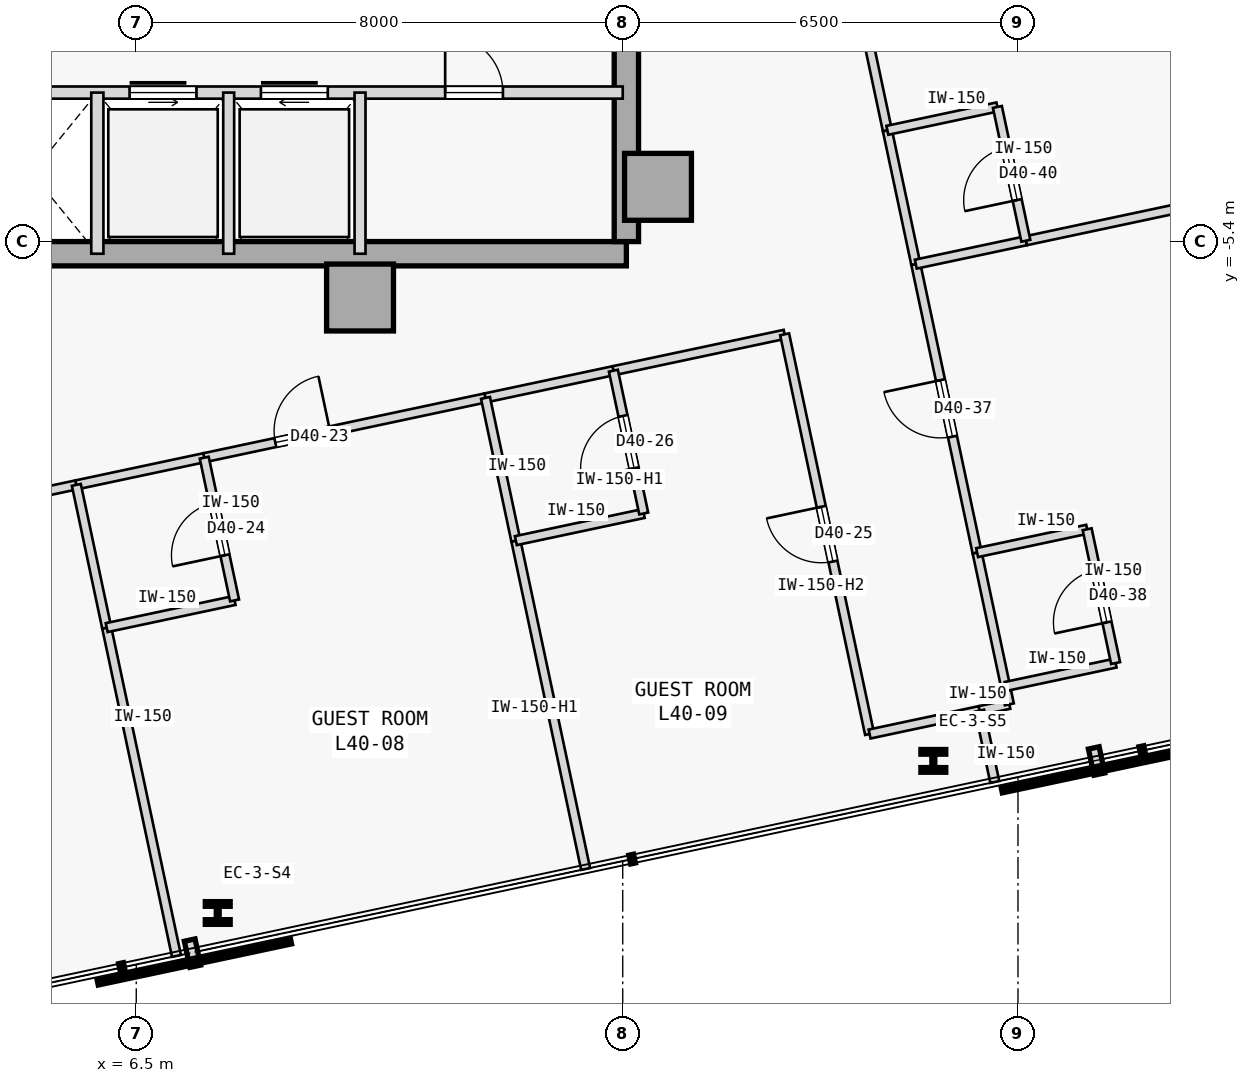
"""IFC4 building model, lengths in metres.
Left out: names, types, materials, properties, quantities, classifications, styles, units other than length and angle.
Written with IfcOpenShell. Run it as: python <this file> out.ifc"""

import sys

from ifc_helpers import new_model, si_unit, direction, frame, frame_2d, origin, origin_2d, place, context, subcontext, project, spatial, rectangle, i_section, extrude, element, fill, save


model = new_model("IFC4")
c1 = context("Model", 3, precision=1e-05, world=origin(), true_north=direction((0.0, 1.0)))
c2 = subcontext(c1, "Body", "Model", "MODEL_VIEW")
j1 = project(units=[si_unit("LENGTHUNIT", "METRE"), si_unit("PLANEANGLEUNIT", "RADIAN")], contexts=[c1])
p1 = place(None, origin())
s1 = spatial("IfcSite", under=j1, at=p1, CompositionType="ELEMENT")
p2 = place(p1, origin())
s2 = spatial("IfcBuilding", under=s1, at=p2, CompositionType="ELEMENT")
p3 = place(p2, frame((0.0, 0.0, 158.2)))
s3 = spatial("IfcBuildingStorey", under=s2, at=p3, CompositionType="ELEMENT", Elevation=158.2)
for number, where, z_axis, x_axis in (
    (1, (15.08, -4.5, 0.0), (0.0, 0.0, 1.0), (1.0, 0.0, 0.0)),
    (2, (10.18, -6.32, 0.0), (0.0, 0.0, 1.0), (1.0, 0.0, 0.0)),
):
    element("IfcColumn", number, at=place(p3, frame(where, z_axis=z_axis, x_axis=x_axis)), inside=s3, PredefinedType="COLUMN", context=c2, shape_type="SweptSolid", body=[
        extrude(rectangle(XDim=1.1, YDim=1.1, at=origin_2d()), origin(), (0.0, 0.0, 1.0), 3.4),
    ])
p4 = place(p3, frame((3.7, -5.6, 0.0), z_axis=(0.0, 0.0, 1.0), x_axis=(1.0, 0.0, 0.0)))
e3 = element("IfcWall", 3, at=p4, inside=s3, PredefinedType="SHEAR", context=c2, shape_type="SweptSolid", body=[
    extrude(rectangle(XDim=10.86, YDim=0.4, at=frame_2d((5.43, 0.0))), origin(), (0.0, 0.0, 1.0), 3.175),
])
p5 = place(p3, frame((14.56, -5.4, 0.0), z_axis=(0.0, 0.0, 1.0), x_axis=(0.0, 1.0, 0.0)))
e4 = element("IfcWall", 4, at=p5, inside=s3, PredefinedType="SHEAR", context=c2, shape_type="SweptSolid", body=[
    extrude(rectangle(XDim=10.8, YDim=0.4, at=frame_2d((5.4, 0.0))), origin(), (0.0, 0.0, 1.0), 3.175),
])
for number, where, z_axis, x_axis in (
    (5, (7.84, -16.441, 0.0), (0.0, 0.0, 1.0), (1.0, 0.0, 0.0)),
    (6, (19.608, -13.94, 0.0), (0.0, 0.0, 1.0), (1.0, 0.0, 0.0)),
):
    element("IfcColumn", number, at=place(p3, frame(where, z_axis=z_axis, x_axis=x_axis)), inside=s3, PredefinedType="COLUMN", context=c2, shape_type="SweptSolid", body=[
        extrude(i_section(OverallWidth=0.409, OverallDepth=0.374, WebThickness=0.048, FlangeThickness=0.077, FilletRadius=0.015, at=origin_2d()), origin(), (0.0, 0.0, 1.0), 3.4),
    ])
p6 = place(p3, frame((3.7, -2.95, 0.0), z_axis=(0.0, 0.0, 1.0), x_axis=(1.0, 0.0, 0.0)))
e7 = element("IfcWall", 7, at=p6, inside=s3, PredefinedType="STANDARD", context=c2, shape_type="SweptSolid", body=[
    extrude(rectangle(XDim=10.8, YDim=0.2, at=frame_2d((5.4, 0.0))), origin(), (0.0, 0.0, 1.0), 3.175),
])
p7 = place(p6, frame((2.69, 0.0, 0.0)))
e8 = element("IfcOpeningElement", 8, at=p7, cuts=e7, PredefinedType="OPENING", context=c2, shape_type="SweptSolid", body=[
    extrude(rectangle(XDim=1.1, YDim=2.15, at=frame_2d((0.55, 1.075))), frame((0.0, 0.11, 0.0), z_axis=(0.0, -1.0, 0.0), x_axis=(1.0, 0.0, 0.0)), (0.0, 0.0, 1.0), 0.22),
])
p8 = place(p6, frame((4.85, 0.0, 0.0)))
e9 = element("IfcOpeningElement", 9, at=p8, cuts=e7, PredefinedType="OPENING", context=c2, shape_type="SweptSolid", body=[
    extrude(rectangle(XDim=1.1, YDim=2.15, at=frame_2d((0.55, 1.075))), frame((0.0, 0.11, 0.0), z_axis=(0.0, -1.0, 0.0), x_axis=(1.0, 0.0, 0.0)), (0.0, 0.0, 1.0), 0.22),
])
p9 = place(p6, frame((7.88, 0.0, 0.0)))
e10 = element("IfcOpeningElement", 10, at=p9, cuts=e7, PredefinedType="OPENING", context=c2, shape_type="SweptSolid", body=[
    extrude(rectangle(XDim=0.95, YDim=2.15, at=frame_2d((0.475, 1.075))), frame((0.0, 0.11, 0.0), z_axis=(0.0, -1.0, 0.0), x_axis=(1.0, 0.0, 0.0)), (0.0, 0.0, 1.0), 0.22),
])
p10 = place(p3, frame((5.86, -5.6, 0.0), z_axis=(0.0, 0.0, 1.0), x_axis=(0.0, 1.0, 0.0)))
e11 = element("IfcWall", 11, at=p10, inside=s3, PredefinedType="STANDARD", context=c2, shape_type="SweptSolid", body=[
    extrude(rectangle(XDim=2.65, YDim=0.2, at=frame_2d((1.325, 0.0))), origin(), (0.0, 0.0, 1.0), 3.175),
])
for number, where, z_axis, x_axis in (
    (12, (10.18, -5.6, 0.0), (0.0, 0.0, 1.0), (0.0, 1.0, 0.0)),
    (13, (8.02, -5.6, 0.0), (0.0, 0.0, 1.0), (0.0, 1.0, 0.0)),
):
    element("IfcWall", number, at=place(p3, frame(where, z_axis=z_axis, x_axis=x_axis)), inside=s3, PredefinedType="STANDARD", context=c2, shape_type="SweptSolid", body=[
        extrude(rectangle(XDim=2.65, YDim=0.18, at=frame_2d((1.325, 0.0))), origin(), (0.0, 0.0, 1.0), 3.175),
    ])
p11 = place(p3, frame((0.889, -10.384, 0.0), z_axis=(0.0, 0.0, 1.0), x_axis=(0.978150846638, 0.207896419455, 0.0)))
e14 = element("IfcWall", 14, at=p11, inside=s3, PredefinedType="PARTITIONING", context=c2, shape_type="SweptSolid", body=[
    extrude(rectangle(XDim=4.729, YDim=0.15, at=frame_2d((2.365, 0.0))), origin(), (0.0, 0.0, 1.0), 3.175),
])
p12 = place(p11, frame((1.905, 0.0, 0.0)))
e15 = element("IfcOpeningElement", 15, at=p12, cuts=e14, PredefinedType="OPENING", context=c2, shape_type="SweptSolid", body=[
    extrude(rectangle(XDim=0.92, YDim=2.15, at=frame_2d((0.46, 1.075))), frame((0.0, 0.085, 0.0), z_axis=(0.0, -1.0, 0.0), x_axis=(1.0, 0.0, 0.0)), (0.0, 0.0, 1.0), 0.17),
])
p13 = place(p3, frame((7.618, -8.954, 0.0), z_axis=(0.0, 0.0, 1.0), x_axis=(0.978140347221, 0.207945812984, 0.0)))
e16 = element("IfcWall", 16, at=p13, inside=s3, PredefinedType="PARTITIONING", context=c2, shape_type="SweptSolid", body=[
    extrude(rectangle(XDim=4.729, YDim=0.15, at=frame_2d((2.365, 0.0))), origin(), (0.0, 0.0, 1.0), 3.175),
])
p14 = place(p13, frame((1.195, 0.0, 0.0)))
e17 = element("IfcOpeningElement", 17, at=p14, cuts=e16, PredefinedType="OPENING", context=c2, shape_type="SweptSolid", body=[
    extrude(rectangle(XDim=0.92, YDim=2.15, at=frame_2d((0.46, 1.075))), frame((0.0, 0.085, 0.0), z_axis=(0.0, -1.0, 0.0), x_axis=(1.0, 0.0, 0.0)), (0.0, 0.0, 1.0), 0.17),
])
p15 = place(p3, frame((5.515, -9.401, 0.0), z_axis=(0.0, 0.0, 1.0), x_axis=(0.978146728319, 0.207915795165, 0.0)))
e18 = element("IfcWall", 18, at=p15, inside=s3, PredefinedType="PARTITIONING", context=c2, shape_type="SweptSolid", body=[
    extrude(rectangle(XDim=2.15, YDim=0.15, at=frame_2d((1.075, 0.0))), origin(), (0.0, 0.0, 1.0), 3.175),
])
p16 = place(p3, frame((14.346, -7.524, 0.0), z_axis=(0.0, 0.0, 1.0), x_axis=(0.97816208355, 0.207843542851, 0.0)))
e19 = element("IfcWall", 19, at=p16, inside=s3, PredefinedType="PARTITIONING", context=c2, shape_type="SweptSolid", body=[
    extrude(rectangle(XDim=2.879, YDim=0.15, at=frame_2d((1.439, 0.0))), origin(), (0.0, 0.0, 1.0), 3.175),
])
p17 = place(p3, frame((18.56, -13.498, 0.0), z_axis=(0.0, 0.0, 1.0), x_axis=(-0.207888737749, 0.978152479278, 0.0)))
e20 = element("IfcWall", 20, at=p17, inside=s3, PredefinedType="PARTITIONING", context=c2, shape_type="SweptSolid", body=[
    extrude(rectangle(XDim=6.72, YDim=0.15, at=frame_2d((3.36, 0.0))), origin(), (0.0, 0.0, 1.0), 2.575),
])
p18 = place(p17, frame((2.9, 0.0, 0.0)))
e21 = element("IfcOpeningElement", 21, at=p18, cuts=e20, PredefinedType="OPENING", context=c2, shape_type="SweptSolid", body=[
    extrude(rectangle(XDim=0.92, YDim=2.15, at=frame_2d((0.46, 1.075))), frame((0.0, 0.085, 0.0), z_axis=(0.0, -1.0, 0.0), x_axis=(1.0, 0.0, 0.0)), (0.0, 0.0, 1.0), 0.17),
])
p19 = place(p3, frame((18.56, -13.498, 0.0), z_axis=(0.0, 0.0, 1.0), x_axis=(0.978160192495, 0.207852442415, 0.0)))
e22 = element("IfcWall", 22, at=p19, inside=s3, PredefinedType="PARTITIONING", context=c2, shape_type="SweptSolid", body=[
    extrude(rectangle(XDim=1.85, YDim=0.15, at=frame_2d((0.925, 0.0))), origin(), (0.0, 0.0, 1.0), 3.175),
])
p20 = place(p3, frame((12.243, -7.971, 0.0), z_axis=(0.0, 0.0, 1.0), x_axis=(0.978146728319, 0.207915795165, 0.0)))
e23 = element("IfcWall", 23, at=p20, inside=s3, PredefinedType="PARTITIONING", context=c2, shape_type="SweptSolid", body=[
    extrude(rectangle(XDim=2.15, YDim=0.15, at=frame_2d((1.075, 0.0))), origin(), (0.0, 0.0, 1.0), 3.175),
])
p21 = place(p3, frame((20.369, -13.114, 0.0), z_axis=(0.0, 0.0, 1.0), x_axis=(0.978143962546, 0.207928806409, 0.0)))
e24 = element("IfcWall", 24, at=p21, inside=s3, PredefinedType="PARTITIONING", context=c2, shape_type="SweptSolid", body=[
    extrude(rectangle(XDim=0.5, YDim=0.15, at=frame_2d((0.25, 0.0))), origin(), (0.0, 0.0, 1.0), 3.175),
])
p22 = place(p3, frame((20.858, -13.01, 0.0), z_axis=(0.0, 0.0, 1.0), x_axis=(-0.208306395052, 0.978063620518, 0.0)))
e25 = element("IfcWall", 25, at=p22, inside=s3, PredefinedType="PARTITIONING", context=c2, shape_type="SweptSolid", body=[
    extrude(rectangle(XDim=0.3, YDim=0.15, at=frame_2d((0.15, 0.0))), origin(), (0.0, 0.0, 1.0), 3.175),
])
p23 = place(p3, frame((20.328, -10.515, 0.0), z_axis=(0.0, 0.0, 1.0), x_axis=(-0.207950868925, 0.97813927235, 0.0)))
e26 = element("IfcWall", 26, at=p23, inside=s3, PredefinedType="PARTITIONING", context=c2, shape_type="SweptSolid", body=[
    extrude(rectangle(XDim=4.85, YDim=0.15, at=frame_2d((2.425, 0.0))), origin(), (0.0, 0.0, 1.0), 3.175),
])
p24 = place(p23, frame((1.95, 0.0, 0.0)))
e27 = element("IfcOpeningElement", 27, at=p24, cuts=e26, PredefinedType="OPENING", context=c2, shape_type="SweptSolid", body=[
    extrude(rectangle(XDim=0.95, YDim=2.15, at=frame_2d((0.475, 1.075))), frame((0.0, 0.085, 0.0), z_axis=(0.0, -1.0, 0.0), x_axis=(1.0, 0.0, 0.0)), (0.0, 0.0, 1.0), 0.17),
])
p25 = place(p3, frame((20.796, -12.716, 0.0), z_axis=(0.0, 0.0, 1.0), x_axis=(-0.207891197838, 0.978151956427, 0.0)))
e28 = element("IfcWall", 28, at=p25, inside=s3, PredefinedType="PARTITIONING", context=c2, shape_type="SweptSolid", body=[
    extrude(rectangle(XDim=2.25, YDim=0.15, at=frame_2d((1.125, 0.0))), origin(), (0.0, 0.0, 1.0), 3.175),
])
p26 = place(p3, frame((18.852, -3.571, 0.0), z_axis=(0.0, 0.0, 1.0), x_axis=(-0.207879907349, 0.978154355979, 0.0)))
e29 = element("IfcWall", 29, at=p26, inside=s3, PredefinedType="PARTITIONING", context=c2, shape_type="SweptSolid", body=[
    extrude(rectangle(XDim=6.35, YDim=0.15, at=frame_2d((3.175, 0.0))), origin(), (0.0, 0.0, 1.0), 3.175),
])
p27 = place(p26, frame((2.7, 0.0, 0.0)))
e30 = element("IfcOpeningElement", 30, at=p27, cuts=e29, PredefinedType="OPENING", context=c2, shape_type="SweptSolid", body=[
    extrude(rectangle(XDim=0.95, YDim=2.15, at=frame_2d((0.475, 1.075))), frame((0.0, 0.085, 0.0), z_axis=(0.0, -1.0, 0.0), x_axis=(1.0, 0.0, 0.0)), (0.0, 0.0, 1.0), 0.17),
])
p28 = place(p3, frame((19.32, -5.771, 0.0), z_axis=(0.0, 0.0, 1.0), x_axis=(-0.207913264065, 0.978147266328, 0.0)))
e31 = element("IfcWall", 31, at=p28, inside=s3, PredefinedType="PARTITIONING", context=c2, shape_type="SweptSolid", body=[
    extrude(rectangle(XDim=2.25, YDim=0.15, at=frame_2d((1.125, 0.0))), origin(), (0.0, 0.0, 1.0), 3.175),
])
p29 = place(p3, frame((7.161, -17.148, 0.0), z_axis=(0.0, 0.0, 1.0), x_axis=(-0.20791588359, 0.978146709523, 0.0)))
e32 = element("IfcWall", 32, at=p29, inside=s3, PredefinedType="PARTITIONING", context=c2, shape_type="SweptSolid", body=[
    extrude(rectangle(XDim=5.52, YDim=0.15, at=frame_2d((2.76, 0.0))), origin(), (0.0, 0.0, 1.0), 3.175),
])
p30 = place(p3, frame((6.014, -11.749, 0.0), z_axis=(0.0, 0.0, 1.0), x_axis=(-0.207937840262, 0.978142042133, 0.0)))
e33 = element("IfcWall", 33, at=p30, inside=s3, PredefinedType="PARTITIONING", context=c2, shape_type="SweptSolid", body=[
    extrude(rectangle(XDim=2.4, YDim=0.15, at=frame_2d((1.2, 0.0))), origin(), (0.0, 0.0, 1.0), 3.175),
])
p31 = place(p3, frame((6.014, -11.749, 0.0), z_axis=(0.0, 0.0, 1.0), x_axis=(0.978146728319, 0.207915795165, 0.0)))
e34 = element("IfcWall", 34, at=p31, inside=s3, PredefinedType="PARTITIONING", context=c2, shape_type="SweptSolid", body=[
    extrude(rectangle(XDim=2.15, YDim=0.15, at=frame_2d((1.075, 0.0))), origin(), (0.0, 0.0, 1.0), 3.175),
])
p32 = place(p3, frame((8.117, -11.302, 0.0), z_axis=(0.0, 0.0, 1.0), x_axis=(-0.207937840262, 0.978142042133, 0.0)))
e35 = element("IfcWall", 35, at=p32, inside=s3, PredefinedType="PARTITIONING", context=c2, shape_type="SweptSolid", body=[
    extrude(rectangle(XDim=2.4, YDim=0.15, at=frame_2d((1.2, 0.0))), origin(), (0.0, 0.0, 1.0), 3.175),
])
p33 = place(p32, frame((0.76, 0.0, 0.0)))
e36 = element("IfcOpeningElement", 36, at=p33, cuts=e35, PredefinedType="OPENING", context=c2, shape_type="SweptSolid", body=[
    extrude(rectangle(XDim=0.88, YDim=2.15, at=frame_2d((0.44, 1.075))), frame((0.0, 0.085, 0.0), z_axis=(0.0, -1.0, 0.0), x_axis=(1.0, 0.0, 0.0)), (0.0, 0.0, 1.0), 0.17),
])
p34 = place(p3, frame((13.89, -15.718, 0.0), z_axis=(0.0, 0.0, 1.0), x_axis=(-0.207873566928, 0.97815570344, 0.0)))
e37 = element("IfcWall", 37, at=p34, inside=s3, PredefinedType="PARTITIONING", context=c2, shape_type="SweptSolid", body=[
    extrude(rectangle(XDim=5.52, YDim=0.15, at=frame_2d((2.76, 0.0))), origin(), (0.0, 0.0, 1.0), 2.725),
])
p35 = place(p3, frame((12.742, -10.318, 0.0), z_axis=(0.0, 0.0, 1.0), x_axis=(-0.207917150959, 0.978146440129, 0.0)))
e38 = element("IfcWall", 38, at=p35, inside=s3, PredefinedType="PARTITIONING", context=c2, shape_type="SweptSolid", body=[
    extrude(rectangle(XDim=2.4, YDim=0.15, at=frame_2d((1.2, 0.0))), origin(), (0.0, 0.0, 1.0), 3.175),
])
p36 = place(p3, frame((12.742, -10.318, 0.0), z_axis=(0.0, 0.0, 1.0), x_axis=(0.978146728319, 0.207915795165, 0.0)))
e39 = element("IfcWall", 39, at=p36, inside=s3, PredefinedType="PARTITIONING", context=c2, shape_type="SweptSolid", body=[
    extrude(rectangle(XDim=2.15, YDim=0.15, at=frame_2d((1.075, 0.0))), origin(), (0.0, 0.0, 1.0), 3.175),
])
p37 = place(p3, frame((14.845, -9.871, 0.0), z_axis=(0.0, 0.0, 1.0), x_axis=(-0.207917150959, 0.978146440129, 0.0)))
e40 = element("IfcWall", 40, at=p37, inside=s3, PredefinedType="PARTITIONING", context=c2, shape_type="SweptSolid", body=[
    extrude(rectangle(XDim=2.4, YDim=0.15, at=frame_2d((1.2, 0.0))), origin(), (0.0, 0.0, 1.0), 2.725),
])
p38 = place(p37, frame((0.76, 0.0, 0.0)))
e41 = element("IfcOpeningElement", 41, at=p38, cuts=e40, PredefinedType="OPENING", context=c2, shape_type="SweptSolid", body=[
    extrude(rectangle(XDim=0.88, YDim=2.15, at=frame_2d((0.44, 1.075))), frame((0.0, 0.085, 0.0), z_axis=(0.0, -1.0, 0.0), x_axis=(1.0, 0.0, 0.0)), (0.0, 0.0, 1.0), 0.17),
])
p39 = place(p3, frame((20.619, -14.288, 0.0), z_axis=(0.0, 0.0, 1.0), x_axis=(-0.207917150959, 0.978146440129, 0.0)))
e42 = element("IfcWall", 42, at=p39, inside=s3, PredefinedType="PARTITIONING", context=c2, shape_type="SweptSolid", body=[
    extrude(rectangle(XDim=1.2, YDim=0.15, at=frame_2d((0.6, 0.0))), origin(), (0.0, 0.0, 1.0), 3.175),
])
for number, where, z_axis, x_axis in (
    (43, (20.796, -12.716, 0.0), (0.0, 0.0, 1.0), (0.978, 0.208, 0.0)),
    (44, (20.328, -10.515, 0.0), (0.0, 0.0, 1.0), (0.978, 0.208, 0.0)),
):
    element("IfcWall", number, at=place(p3, frame(where, z_axis=z_axis, x_axis=x_axis)), inside=s3, PredefinedType="PARTITIONING", context=c2, shape_type="SweptSolid", body=[
        extrude(rectangle(XDim=1.85, YDim=0.15, at=frame_2d((0.925, 0.0))), origin(), (0.0, 0.0, 1.0), 3.175),
    ])
p40 = place(p3, frame((22.605, -12.332, 0.0), z_axis=(0.0, 0.0, 1.0), x_axis=(-0.207891197838, 0.978151956427, 0.0)))
e45 = element("IfcWall", 45, at=p40, inside=s3, PredefinedType="PARTITIONING", context=c2, shape_type="SweptSolid", body=[
    extrude(rectangle(XDim=2.25, YDim=0.15, at=frame_2d((1.125, 0.0))), origin(), (0.0, 0.0, 1.0), 3.175),
])
p41 = place(p40, frame((0.685, 0.0, 0.0)))
e46 = element("IfcOpeningElement", 46, at=p41, cuts=e45, PredefinedType="OPENING", context=c2, shape_type="SweptSolid", body=[
    extrude(rectangle(XDim=0.88, YDim=2.15, at=frame_2d((0.44, 1.075))), frame((0.0, 0.085, 0.0), z_axis=(0.0, -1.0, 0.0), x_axis=(1.0, 0.0, 0.0)), (0.0, 0.0, 1.0), 0.17),
])
p42 = place(p3, frame((21.129, -5.387, 0.0), z_axis=(0.0, 0.0, 1.0), x_axis=(0.97814556055, 0.207921288896, 0.0)))
e47 = element("IfcWall", 47, at=p42, inside=s3, PredefinedType="PARTITIONING", context=c2, shape_type="SweptSolid", body=[
    extrude(rectangle(XDim=12.187, YDim=0.15, at=frame_2d((6.094, 0.0))), origin(), (0.0, 0.0, 1.0), 2.725),
])
p43 = place(p3, frame((19.32, -5.771, 0.0), z_axis=(0.0, 0.0, 1.0), x_axis=(0.978165892835, 0.207825614625, 0.0)))
e48 = element("IfcWall", 48, at=p43, inside=s3, PredefinedType="PARTITIONING", context=c2, shape_type="SweptSolid", body=[
    extrude(rectangle(XDim=1.85, YDim=0.15, at=frame_2d((0.925, 0.0))), origin(), (0.0, 0.0, 1.0), 3.175),
])
p44 = place(p3, frame((18.852, -3.571, 0.0), z_axis=(0.0, 0.0, 1.0), x_axis=(0.978139061018, 0.207951862966, 0.0)))
e49 = element("IfcWall", 49, at=p44, inside=s3, PredefinedType="PARTITIONING", context=c2, shape_type="SweptSolid", body=[
    extrude(rectangle(XDim=1.85, YDim=0.15, at=frame_2d((0.925, 0.0))), origin(), (0.0, 0.0, 1.0), 3.175),
])
p45 = place(p3, frame((21.129, -5.387, 0.0), z_axis=(0.0, 0.0, 1.0), x_axis=(-0.207891197838, 0.978151956427, 0.0)))
e50 = element("IfcWall", 50, at=p45, inside=s3, PredefinedType="PARTITIONING", context=c2, shape_type="SweptSolid", body=[
    extrude(rectangle(XDim=2.25, YDim=0.15, at=frame_2d((1.125, 0.0))), origin(), (0.0, 0.0, 1.0), 3.175),
])
p46 = place(p45, frame((0.685, 0.0, 0.0)))
e51 = element("IfcOpeningElement", 51, at=p46, cuts=e50, PredefinedType="OPENING", context=c2, shape_type="SweptSolid", body=[
    extrude(rectangle(XDim=0.88, YDim=2.15, at=frame_2d((0.44, 1.075))), frame((0.0, 0.085, 0.0), z_axis=(0.0, -1.0, 0.0), x_axis=(1.0, 0.0, 0.0)), (0.0, 0.0, 1.0), 0.17),
])
p47 = place(p7, origin())
e52 = element("IfcDoor", 52, at=p47, inside=s3, OperationType="SLIDING_TO_LEFT", PredefinedType="DOOR", context=c2, shape_type="SweptSolid", body=[
    extrude(rectangle(XDim=1.1, YDim=2.15, at=frame_2d((0.55, 1.075))), frame((0.0, 0.025, 0.0), z_axis=(0.0, -1.0, 0.0), x_axis=(1.0, 0.0, 0.0)), (0.0, 0.0, 1.0), 0.05),
])
fill(e8, e52)
p48 = place(p8, origin())
e53 = element("IfcDoor", 53, at=p48, inside=s3, OperationType="SLIDING_TO_RIGHT", PredefinedType="DOOR", context=c2, shape_type="SweptSolid", body=[
    extrude(rectangle(XDim=1.1, YDim=2.15, at=frame_2d((0.55, 1.075))), frame((0.0, 0.025, 0.0), z_axis=(0.0, -1.0, 0.0), x_axis=(1.0, 0.0, 0.0)), (0.0, 0.0, 1.0), 0.05),
])
fill(e9, e53)
p49 = place(p9, origin())
e54 = element("IfcDoor", 54, at=p49, inside=s3, OperationType="SINGLE_SWING_LEFT", PredefinedType="DOOR", context=c2, shape_type="SweptSolid", body=[
    extrude(rectangle(XDim=0.95, YDim=2.15, at=frame_2d((0.475, 1.075))), frame((0.0, 0.025, 0.0), z_axis=(0.0, -1.0, 0.0), x_axis=(1.0, 0.0, 0.0)), (0.0, 0.0, 1.0), 0.05),
])
fill(e10, e54)
p50 = place(p14, origin())
e55 = element("IfcDoor", 55, at=p50, inside=s3, OperationType="SINGLE_SWING_RIGHT", PredefinedType="DOOR", context=c2, shape_type="SweptSolid", body=[
    extrude(rectangle(XDim=0.92, YDim=2.15, at=frame_2d((0.46, 1.075))), frame((0.0, 0.025, 0.0), z_axis=(0.0, -1.0, 0.0), x_axis=(1.0, 0.0, 0.0)), (0.0, 0.0, 1.0), 0.05),
])
fill(e17, e55)
p51 = place(p33, origin())
e56 = element("IfcDoor", 56, at=p51, inside=s3, OperationType="SINGLE_SWING_LEFT", PredefinedType="DOOR", context=c2, shape_type="SweptSolid", body=[
    extrude(rectangle(XDim=0.88, YDim=2.15, at=frame_2d((0.44, 1.075))), frame((0.0, 0.025, 0.0), z_axis=(0.0, -1.0, 0.0), x_axis=(1.0, 0.0, 0.0)), (0.0, 0.0, 1.0), 0.05),
])
fill(e36, e56)
p52 = place(p18, origin())
e57 = element("IfcDoor", 57, at=p52, inside=s3, OperationType="SINGLE_SWING_RIGHT", PredefinedType="DOOR", context=c2, shape_type="SweptSolid", body=[
    extrude(rectangle(XDim=0.92, YDim=2.15, at=frame_2d((0.46, 1.075))), frame((0.0, 0.025, 0.0), z_axis=(0.0, -1.0, 0.0), x_axis=(1.0, 0.0, 0.0)), (0.0, 0.0, 1.0), 0.05),
])
fill(e21, e57)
p53 = place(p38, origin())
e58 = element("IfcDoor", 58, at=p53, inside=s3, OperationType="SINGLE_SWING_LEFT", PredefinedType="DOOR", context=c2, shape_type="SweptSolid", body=[
    extrude(rectangle(XDim=0.88, YDim=2.15, at=frame_2d((0.44, 1.075))), frame((0.0, 0.025, 0.0), z_axis=(0.0, -1.0, 0.0), x_axis=(1.0, 0.0, 0.0)), (0.0, 0.0, 1.0), 0.05),
])
fill(e41, e58)
p54 = place(p24, origin())
e59 = element("IfcDoor", 59, at=p54, inside=s3, OperationType="SINGLE_SWING_RIGHT", PredefinedType="DOOR", context=c2, shape_type="SweptSolid", body=[
    extrude(rectangle(XDim=0.95, YDim=2.15, at=frame_2d((0.475, 1.075))), frame((0.0, 0.025, 0.0), z_axis=(0.0, -1.0, 0.0), x_axis=(1.0, 0.0, 0.0)), (0.0, 0.0, 1.0), 0.05),
])
fill(e27, e59)
p55 = place(p41, origin())
e60 = element("IfcDoor", 60, at=p55, inside=s3, OperationType="SINGLE_SWING_LEFT", PredefinedType="DOOR", context=c2, shape_type="SweptSolid", body=[
    extrude(rectangle(XDim=0.88, YDim=2.15, at=frame_2d((0.44, 1.075))), frame((0.0, 0.025, 0.0), z_axis=(0.0, -1.0, 0.0), x_axis=(1.0, 0.0, 0.0)), (0.0, 0.0, 1.0), 0.05),
])
fill(e46, e60)
p56 = place(p46, origin())
e61 = element("IfcDoor", 61, at=p56, inside=s3, OperationType="SINGLE_SWING_LEFT", PredefinedType="DOOR", context=c2, shape_type="SweptSolid", body=[
    extrude(rectangle(XDim=0.88, YDim=2.15, at=frame_2d((0.44, 1.075))), frame((0.0, 0.025, 0.0), z_axis=(0.0, -1.0, 0.0), x_axis=(1.0, 0.0, 0.0)), (0.0, 0.0, 1.0), 0.05),
])
fill(e51, e61)
save(model, sys.argv[1])
